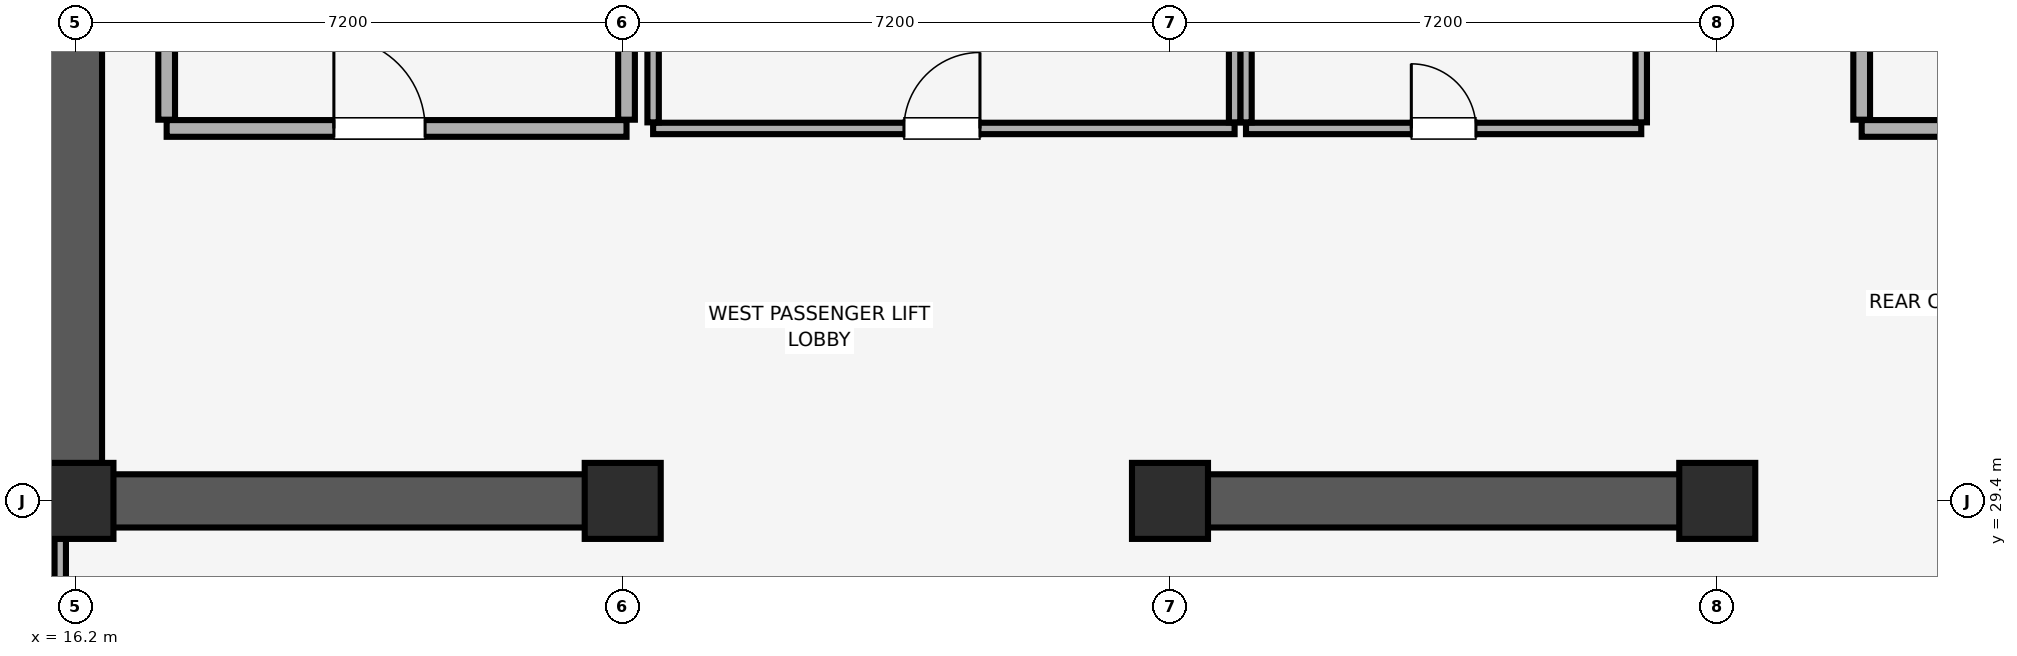
"""IFC4 building model, lengths in metres.
Left out: names, types, materials, properties, quantities, classifications, styles, units other than length and angle.
Written with IfcOpenShell. Run it as: python <this file> out.ifc"""

import sys

from ifc_helpers import new_model, si_unit, direction, frame, frame_2d, origin, origin_2d, place, context, subcontext, project, spatial, rectangle, extrude, element, fill, save


model = new_model("IFC4")
c1 = context("Model", 3, precision=1e-05, world=origin(), true_north=direction((0.0, 1.0)))
c2 = subcontext(c1, "Body", "Model", "MODEL_VIEW")
j1 = project(units=[si_unit("LENGTHUNIT", "METRE"), si_unit("PLANEANGLEUNIT", "RADIAN")], contexts=[c1])
p1 = place(None, origin())
s1 = spatial("IfcSite", under=j1, at=p1, CompositionType="ELEMENT")
p2 = place(p1, origin())
s2 = spatial("IfcBuilding", under=s1, at=p2, CompositionType="ELEMENT")
p3 = place(p2, frame((0.0, 0.0, 305.7)))
s3 = spatial("IfcBuildingStorey", under=s2, at=p3, CompositionType="ELEMENT", Elevation=305.7)
for number, where, z_axis, x_axis in (
    (1, (16.2, 29.4, 0.0), (0.0, 0.0, 1.0), (1.0, 0.0, 0.0)),
    (2, (23.4, 29.4, 0.0), (0.0, 0.0, 1.0), (1.0, 0.0, 0.0)),
    (3, (30.6, 29.4, 0.0), (0.0, 0.0, 1.0), (1.0, 0.0, 0.0)),
    (4, (37.8, 29.4, 0.0), (0.0, 0.0, 1.0), (1.0, 0.0, 0.0)),
):
    element("IfcColumn", number, at=place(p3, frame(where, z_axis=z_axis, x_axis=x_axis)), inside=s3, PredefinedType="COLUMN", context=c2, shape_type="SweptSolid", body=[
        extrude(rectangle(XDim=1.0, YDim=1.0, at=origin_2d()), origin(), (0.0, 0.0, 1.0), 4.7),
    ])
p4 = place(p3, frame((16.2, 29.4, 0.0), z_axis=(0.0, 0.0, 1.0), x_axis=(0.0, 1.0, 0.0)))
e5 = element("IfcWall", 5, at=p4, inside=s3, PredefinedType="SHEAR", context=c2, shape_type="SweptSolid", body=[
    extrude(rectangle(XDim=19.2, YDim=0.7, at=frame_2d((9.6, 0.0))), origin(), (0.0, 0.0, 1.0), 4.7),
])
p5 = place(p3, frame((16.555, 29.4, 0.0), z_axis=(0.0, 0.0, 1.0), x_axis=(1.0, 0.0, 0.0)))
e6 = element("IfcWall", 6, at=p5, inside=s3, PredefinedType="SHEAR", context=c2, shape_type="SweptSolid", body=[
    extrude(rectangle(XDim=7.045, YDim=0.7, at=frame_2d((3.522, 0.0))), origin(), (0.0, 0.0, 1.0), 4.7),
])
p6 = place(p3, frame((30.4, 29.4, 0.0), z_axis=(0.0, 0.0, 1.0), x_axis=(1.0, 0.0, 0.0)))
e7 = element("IfcWall", 7, at=p6, inside=s3, PredefinedType="SHEAR", context=c2, shape_type="SweptSolid", body=[
    extrude(rectangle(XDim=7.6, YDim=0.7, at=frame_2d((3.8, 0.0))), origin(), (0.0, 0.0, 1.0), 4.7),
])
p7 = place(p3, frame((17.4, 34.3, 0.0), z_axis=(0.0, 0.0, 1.0), x_axis=(1.0, 0.0, 0.0)))
e8 = element("IfcWall", 8, at=p7, inside=s3, PredefinedType="PARTITIONING", context=c2, shape_type="SweptSolid", body=[
    extrude(rectangle(XDim=6.05, YDim=0.22, at=frame_2d((3.025, 0.0))), origin(), (0.0, 0.0, 1.0), 4.7),
])
p8 = place(p7, frame((2.2, 0.0, 0.0)))
e9 = element("IfcOpeningElement", 9, at=p8, cuts=e8, PredefinedType="OPENING", context=c2, shape_type="SweptSolid", body=[
    extrude(rectangle(XDim=1.2, YDim=2.15, at=frame_2d((0.6, 1.075))), frame((0.0, 0.12, 0.0), z_axis=(0.0, -1.0, 0.0), x_axis=(1.0, 0.0, 0.0)), (0.0, 0.0, 1.0), 0.24),
])
p9 = place(p3, frame((17.4, 34.415, 0.0), z_axis=(0.0, 0.0, 1.0), x_axis=(0.0, 1.0, 0.0)))
e10 = element("IfcWall", 10, at=p9, inside=s3, PredefinedType="PARTITIONING", context=c2, shape_type="SweptSolid", body=[
    extrude(rectangle(XDim=5.43, YDim=0.22, at=frame_2d((2.715, 0.0))), origin(), (0.0, 0.0, 1.0), 4.7),
])
p10 = place(p3, frame((23.45, 34.415, 0.0), z_axis=(0.0, 0.0, 1.0), x_axis=(0.0, 1.0, 0.0)))
e11 = element("IfcWall", 11, at=p10, inside=s3, PredefinedType="PARTITIONING", context=c2, shape_type="SweptSolid", body=[
    extrude(rectangle(XDim=5.64, YDim=0.22, at=frame_2d((2.82, 0.0))), origin(), (0.0, 0.0, 1.0), 4.7),
])
p11 = place(p3, frame((39.7, 34.3, 0.0), z_axis=(0.0, 0.0, 1.0), x_axis=(1.0, 0.0, 0.0)))
e12 = element("IfcWall", 12, at=p11, inside=s3, PredefinedType="PARTITIONING", context=c2, shape_type="SweptSolid", body=[
    extrude(rectangle(XDim=4.6, YDim=0.22, at=frame_2d((2.3, 0.0))), origin(), (0.0, 0.0, 1.0), 4.7),
])
p12 = place(p11, frame((1.7, 0.0, 0.0)))
e13 = element("IfcOpeningElement", 13, at=p12, cuts=e12, PredefinedType="OPENING", context=c2, shape_type="SweptSolid", body=[
    extrude(rectangle(XDim=1.2, YDim=2.15, at=frame_2d((0.6, 1.075))), frame((0.0, 0.12, 0.0), z_axis=(0.0, -1.0, 0.0), x_axis=(1.0, 0.0, 0.0)), (0.0, 0.0, 1.0), 0.24),
])
p13 = place(p3, frame((39.7, 34.415, 0.0), z_axis=(0.0, 0.0, 1.0), x_axis=(0.0, 1.0, 0.0)))
e14 = element("IfcWall", 14, at=p13, inside=s3, PredefinedType="PARTITIONING", context=c2, shape_type="SweptSolid", body=[
    extrude(rectangle(XDim=5.785, YDim=0.22, at=frame_2d((2.893, 0.0))), origin(), (0.0, 0.0, 1.0), 4.7),
])
p14 = place(p3, frame((31.6, 34.3, 0.0), z_axis=(0.0, 0.0, 1.0), x_axis=(1.0, 0.0, 0.0)))
e15 = element("IfcWall", 15, at=p14, inside=s3, PredefinedType="PARTITIONING", context=c2, shape_type="SweptSolid", body=[
    extrude(rectangle(XDim=5.2, YDim=0.15, at=frame_2d((2.6, 0.0))), origin(), (0.0, 0.0, 1.0), 4.7),
])
p15 = place(p14, frame((2.175, 0.0, 0.0)))
e16 = element("IfcOpeningElement", 16, at=p15, cuts=e15, PredefinedType="OPENING", context=c2, shape_type="SweptSolid", body=[
    extrude(rectangle(XDim=0.85, YDim=2.1, at=frame_2d((0.425, 1.05))), frame((0.0, 0.085, 0.0), z_axis=(0.0, -1.0, 0.0), x_axis=(1.0, 0.0, 0.0)), (0.0, 0.0, 1.0), 0.17),
])
for number, where, z_axis, x_axis in (
    (17, (31.6, 34.38, 0.0), (0.0, 0.0, 1.0), (0.0, 1.0, 0.0)),
    (18, (36.8, 34.38, 0.0), (0.0, 0.0, 1.0), (0.0, 1.0, 0.0)),
):
    element("IfcWall", number, at=place(p3, frame(where, z_axis=z_axis, x_axis=x_axis)), inside=s3, PredefinedType="PARTITIONING", context=c2, shape_type="SweptSolid", body=[
        extrude(rectangle(XDim=4.94, YDim=0.15, at=frame_2d((2.47, 0.0))), origin(), (0.0, 0.0, 1.0), 4.7),
    ])
p16 = place(p3, frame((23.8, 34.3, 0.0), z_axis=(0.0, 0.0, 1.0), x_axis=(1.0, 0.0, 0.0)))
e19 = element("IfcWall", 19, at=p16, inside=s3, PredefinedType="PARTITIONING", context=c2, shape_type="SweptSolid", body=[
    extrude(rectangle(XDim=7.65, YDim=0.15, at=frame_2d((3.825, 0.0))), origin(), (0.0, 0.0, 1.0), 4.7),
])
p17 = place(p16, frame((3.3, 0.0, 0.0)))
e20 = element("IfcOpeningElement", 20, at=p17, cuts=e19, PredefinedType="OPENING", context=c2, shape_type="SweptSolid", body=[
    extrude(rectangle(XDim=1.0, YDim=2.15, at=frame_2d((0.5, 1.075))), frame((0.0, 0.085, 0.0), z_axis=(0.0, -1.0, 0.0), x_axis=(1.0, 0.0, 0.0)), (0.0, 0.0, 1.0), 0.17),
])
for number, where, z_axis, x_axis in (
    (21, (23.8, 34.38, 0.0), (0.0, 0.0, 1.0), (0.0, 1.0, 0.0)),
    (22, (31.45, 34.38, 0.0), (0.0, 0.0, 1.0), (0.0, 1.0, 0.0)),
):
    element("IfcWall", number, at=place(p3, frame(where, z_axis=z_axis, x_axis=x_axis)), inside=s3, PredefinedType="PARTITIONING", context=c2, shape_type="SweptSolid", body=[
        extrude(rectangle(XDim=4.94, YDim=0.15, at=frame_2d((2.47, 0.0))), origin(), (0.0, 0.0, 1.0), 4.7),
    ])
p18 = place(p3, frame((16.0, 25.08, 0.0), z_axis=(0.0, 0.0, 1.0), x_axis=(0.0, 1.0, 0.0)))
e23 = element("IfcWall", 23, at=p18, inside=s3, PredefinedType="PARTITIONING", context=c2, shape_type="SweptSolid", body=[
    extrude(rectangle(XDim=4.31, YDim=0.15, at=frame_2d((2.155, 0.0))), origin(), (0.0, 0.0, 1.0), 4.7),
])
p19 = place(p18, frame((1.62, 0.0, 0.0)))
e24 = element("IfcOpeningElement", 24, at=p19, cuts=e23, PredefinedType="OPENING", context=c2, shape_type="SweptSolid", body=[
    extrude(rectangle(XDim=1.0, YDim=2.15, at=frame_2d((0.5, 1.075))), frame((0.0, 0.085, 0.0), z_axis=(0.0, -1.0, 0.0), x_axis=(1.0, 0.0, 0.0)), (0.0, 0.0, 1.0), 0.17),
])
p20 = place(p8, origin())
e25 = element("IfcDoor", 25, at=p20, inside=s3, OperationType="SINGLE_SWING_LEFT", PredefinedType="DOOR", context=c2, shape_type="SweptSolid", body=[
    extrude(rectangle(XDim=1.2, YDim=2.15, at=frame_2d((0.6, 1.075))), frame((0.0, 0.025, 0.0), z_axis=(0.0, -1.0, 0.0), x_axis=(1.0, 0.0, 0.0)), (0.0, 0.0, 1.0), 0.05),
])
fill(e9, e25)
p21 = place(p15, origin())
e26 = element("IfcDoor", 26, at=p21, inside=s3, OperationType="SINGLE_SWING_LEFT", PredefinedType="DOOR", context=c2, shape_type="SweptSolid", body=[
    extrude(rectangle(XDim=0.85, YDim=2.1, at=frame_2d((0.425, 1.05))), frame((0.0, 0.025, 0.0), z_axis=(0.0, -1.0, 0.0), x_axis=(1.0, 0.0, 0.0)), (0.0, 0.0, 1.0), 0.05),
])
fill(e16, e26)
p22 = place(p17, origin())
e27 = element("IfcDoor", 27, at=p22, inside=s3, OperationType="SINGLE_SWING_RIGHT", PredefinedType="DOOR", context=c2, shape_type="SweptSolid", body=[
    extrude(rectangle(XDim=1.0, YDim=2.15, at=frame_2d((0.5, 1.075))), frame((0.0, 0.025, 0.0), z_axis=(0.0, -1.0, 0.0), x_axis=(1.0, 0.0, 0.0)), (0.0, 0.0, 1.0), 0.05),
])
fill(e20, e27)
save(model, sys.argv[1])
